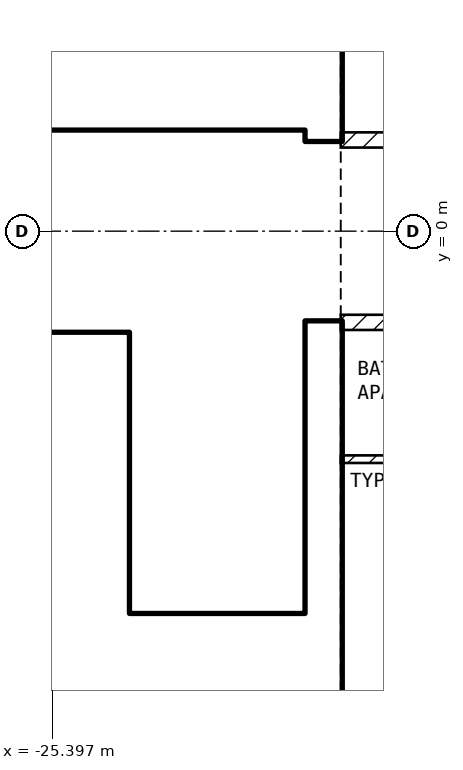
"""IFC4 building model, lengths in metres.
Left out: names, types, materials, properties, quantities, classifications, styles, units other than length and angle.
Written with IfcOpenShell. Run it as: python <this file> out.ifc"""

import sys

from ifc_helpers import new_model, si_unit, direction, frame, frame_2d, origin, place, context, subcontext, project, spatial, rectangle, extrude, element, fill, save


model = new_model("IFC4")
c1 = context("Model", 3, precision=1e-05, world=origin(), true_north=direction((0.0, 1.0)))
c2 = subcontext(c1, "Body", "Model", "MODEL_VIEW")
j1 = project(units=[si_unit("LENGTHUNIT", "METRE"), si_unit("PLANEANGLEUNIT", "RADIAN")], contexts=[c1])
p1 = place(None, origin())
s1 = spatial("IfcSite", under=j1, at=p1, CompositionType="ELEMENT")
p2 = place(p1, origin())
s2 = spatial("IfcBuilding", under=s1, at=p2, CompositionType="ELEMENT")
p3 = place(p2, frame((0.0, 0.0, 177.1)))
s3 = spatial("IfcBuildingStorey", under=s2, at=p3, CompositionType="ELEMENT", Elevation=177.1)
for number, where, z_axis, x_axis in (
    (1, (-21.825, -8.1, 0.0), (0.0, 0.0, 1.0), (0.0, 1.0, 0.0)),
    (2, (-21.825, 1.2, 0.0), (0.0, 0.0, 1.0), (0.0, 1.0, 0.0)),
):
    element("IfcWall", number, at=place(p3, frame(where, z_axis=z_axis, x_axis=x_axis)), inside=s3, PredefinedType="SHEAR", context=c2, shape_type="SweptSolid", body=[
        extrude(rectangle(XDim=6.9, YDim=0.45, at=frame_2d((3.45, 0.0))), origin(), (0.0, 0.0, 1.0), 3.25),
    ])
p4 = place(p3, frame((-33.2, 1.45, 0.0), z_axis=(0.0, 0.0, 1.0), x_axis=(1.0, 0.0, 0.0)))
e3 = element("IfcWall", 3, at=p4, inside=s3, PredefinedType="SOLIDWALL", context=c2, shape_type="SweptSolid", body=[
    extrude(rectangle(XDim=11.15, YDim=0.2, at=frame_2d((5.575, 0.0))), origin(), (0.0, 0.0, 1.0), 3.25),
])
p5 = place(p4, frame((9.4, 0.0, 0.0)))
e4 = element("IfcOpeningElement", 4, at=p5, cuts=e3, PredefinedType="OPENING", context=c2, shape_type="SweptSolid", body=[
    extrude(rectangle(XDim=1.0, YDim=2.1, at=frame_2d((0.5, 1.05))), frame((0.0, 0.11, 0.0), z_axis=(0.0, -1.0, 0.0), x_axis=(1.0, 0.0, 0.0)), (0.0, 0.0, 1.0), 0.22),
])
p6 = place(p4, frame((6.9, 0.0, 0.0)))
e5 = element("IfcOpeningElement", 5, at=p6, cuts=e3, PredefinedType="OPENING", context=c2, shape_type="SweptSolid", body=[
    extrude(rectangle(XDim=1.0, YDim=2.1, at=frame_2d((0.5, 1.05))), frame((0.0, 0.11, 0.0), z_axis=(0.0, -1.0, 0.0), x_axis=(1.0, 0.0, 0.0)), (0.0, 0.0, 1.0), 0.22),
])
p7 = place(p4, frame((1.1, 0.0, 0.0)))
e6 = element("IfcOpeningElement", 6, at=p7, cuts=e3, PredefinedType="OPENING", context=c2, shape_type="SweptSolid", body=[
    extrude(rectangle(XDim=0.9, YDim=2.1, at=frame_2d((0.45, 1.05))), frame((0.0, 0.11, 0.0), z_axis=(0.0, -1.0, 0.0), x_axis=(1.0, 0.0, 0.0)), (0.0, 0.0, 1.0), 0.22),
])
p8 = place(p3, frame((-24.5, -5.05, 0.0), z_axis=(0.0, 0.0, 1.0), x_axis=(0.0, 1.0, 0.0)))
e7 = element("IfcWall", 7, at=p8, inside=s3, PredefinedType="SOLIDWALL", context=c2, shape_type="SweptSolid", body=[
    extrude(rectangle(XDim=3.7, YDim=0.2, at=frame_2d((1.85, 0.0))), origin(), (0.0, 0.0, 1.0), 3.25),
])
p9 = place(p8, frame((0.1, 0.0, 0.0)))
e8 = element("IfcOpeningElement", 8, at=p9, cuts=e7, PredefinedType="OPENING", context=c2, shape_type="SweptSolid", body=[
    extrude(rectangle(XDim=0.8, YDim=2.1, at=frame_2d((0.4, 1.05))), frame((0.0, 0.11, 0.0), z_axis=(0.0, -1.0, 0.0), x_axis=(1.0, 0.0, 0.0)), (0.0, 0.0, 1.0), 0.22),
])
p10 = place(p3, frame((-28.35, -5.15, 0.0), z_axis=(0.0, 0.0, 1.0), x_axis=(1.0, 0.0, 0.0)))
e9 = element("IfcWall", 9, at=p10, inside=s3, PredefinedType="SOLIDWALL", context=c2, shape_type="SweptSolid", body=[
    extrude(rectangle(XDim=6.3, YDim=0.2, at=frame_2d((3.15, 0.0))), origin(), (0.0, 0.0, 1.0), 3.25),
])
p11 = place(p10, frame((5.1, 0.0, 0.0)))
e10 = element("IfcOpeningElement", 10, at=p11, cuts=e9, PredefinedType="OPENING", context=c2, shape_type="SweptSolid", body=[
    extrude(rectangle(XDim=1.0, YDim=2.1, at=frame_2d((0.5, 1.05))), frame((0.0, 0.11, 0.0), z_axis=(0.0, -1.0, 0.0), x_axis=(1.0, 0.0, 0.0)), (0.0, 0.0, 1.0), 0.22),
])
p12 = place(p3, frame((-33.2, -1.45, 0.0), z_axis=(0.0, 0.0, 1.0), x_axis=(1.0, 0.0, 0.0)))
e11 = element("IfcWall", 11, at=p12, inside=s3, PredefinedType="SOLIDWALL", context=c2, shape_type="SweptSolid", body=[
    extrude(rectangle(XDim=8.6, YDim=0.2, at=frame_2d((4.3, 0.0))), origin(), (0.0, 0.0, 1.0), 3.25),
])
p13 = place(p12, frame((7.2, 0.0, 0.0)))
e12 = element("IfcOpeningElement", 12, at=p13, cuts=e11, PredefinedType="OPENING", context=c2, shape_type="SweptSolid", body=[
    extrude(rectangle(XDim=1.0, YDim=2.1, at=frame_2d((0.5, 1.05))), frame((0.0, 0.11, 0.0), z_axis=(0.0, -1.0, 0.0), x_axis=(1.0, 0.0, 0.0)), (0.0, 0.0, 1.0), 0.22),
])
p14 = place(p12, frame((5.2, 0.0, 0.0)))
e13 = element("IfcOpeningElement", 13, at=p14, cuts=e11, PredefinedType="OPENING", context=c2, shape_type="SweptSolid", body=[
    extrude(rectangle(XDim=1.0, YDim=2.1, at=frame_2d((0.5, 1.05))), frame((0.0, 0.11, 0.0), z_axis=(0.0, -1.0, 0.0), x_axis=(1.0, 0.0, 0.0)), (0.0, 0.0, 1.0), 0.22),
])
p15 = place(p12, frame((3.2, 0.0, 0.0)))
e14 = element("IfcOpeningElement", 14, at=p15, cuts=e11, PredefinedType="OPENING", context=c2, shape_type="SweptSolid", body=[
    extrude(rectangle(XDim=1.0, YDim=2.1, at=frame_2d((0.5, 1.05))), frame((0.0, 0.11, 0.0), z_axis=(0.0, -1.0, 0.0), x_axis=(1.0, 0.0, 0.0)), (0.0, 0.0, 1.0), 0.22),
])
p16 = place(p12, frame((0.85, 0.0, 0.0)))
e15 = element("IfcOpeningElement", 15, at=p16, cuts=e11, PredefinedType="OPENING", context=c2, shape_type="SweptSolid", body=[
    extrude(rectangle(XDim=0.9, YDim=2.1, at=frame_2d((0.45, 1.05))), frame((0.0, 0.11, 0.0), z_axis=(0.0, -1.0, 0.0), x_axis=(1.0, 0.0, 0.0)), (0.0, 0.0, 1.0), 0.22),
])
p17 = place(p3, frame((-33.2, -3.95, 0.0), z_axis=(0.0, 0.0, 1.0), x_axis=(1.0, 0.0, 0.0)))
e16 = element("IfcWall", 16, at=p17, inside=s3, PredefinedType="SOLIDWALL", context=c2, shape_type="SweptSolid", body=[
    extrude(rectangle(XDim=8.6, YDim=0.2, at=frame_2d((4.3, 0.0))), origin(), (0.0, 0.0, 1.0), 3.25),
])
p18 = place(p3, frame((-21.6, 1.2, 0.0), z_axis=(0.0, 0.0, 1.0), x_axis=(1.0, 0.0, 0.0)))
e17 = element("IfcWall", 17, at=p18, inside=s3, PredefinedType="PARTITIONING", context=c2, shape_type="SweptSolid", body=[
    extrude(rectangle(XDim=17.2, YDim=0.2, at=frame_2d((8.6, 0.0))), origin(), (0.0, 0.0, 1.0), 3.25),
])
p19 = place(p18, frame((7.75, 0.0, 0.0)))
e18 = element("IfcOpeningElement", 18, at=p19, cuts=e17, PredefinedType="OPENING", context=c2, shape_type="SweptSolid", body=[
    extrude(rectangle(XDim=1.0, YDim=2.1, at=frame_2d((0.5, 1.05))), frame((0.0, 0.11, 0.0), z_axis=(0.0, -1.0, 0.0), x_axis=(1.0, 0.0, 0.0)), (0.0, 0.0, 1.0), 0.22),
])
p20 = place(p3, frame((-4.4, -1.2, 0.0), z_axis=(0.0, 0.0, 1.0), x_axis=(-1.0, 0.0, 0.0)))
e19 = element("IfcWall", 19, at=p20, inside=s3, PredefinedType="PARTITIONING", context=c2, shape_type="SweptSolid", body=[
    extrude(rectangle(XDim=17.2, YDim=0.2, at=frame_2d((8.6, 0.0))), origin(), (0.0, 0.0, 1.0), 3.25),
])
p21 = place(p20, frame((12.35, 0.0, 0.0)))
e20 = element("IfcOpeningElement", 20, at=p21, cuts=e19, PredefinedType="OPENING", context=c2, shape_type="SweptSolid", body=[
    extrude(rectangle(XDim=1.0, YDim=2.1, at=frame_2d((0.5, 1.05))), frame((0.0, 0.11, 0.0), z_axis=(0.0, -1.0, 0.0), x_axis=(1.0, 0.0, 0.0)), (0.0, 0.0, 1.0), 0.22),
])
p22 = place(p3, frame((-18.45, -3.0, 0.0), z_axis=(0.0, 0.0, 1.0), x_axis=(-1.0, 0.0, 0.0)))
e21 = element("IfcWall", 21, at=p22, inside=s3, PredefinedType="PARTITIONING", context=c2, shape_type="SweptSolid", body=[
    extrude(rectangle(XDim=3.15, YDim=0.1, at=frame_2d((1.575, 0.0))), origin(), (0.0, 0.0, 1.0), 3.25),
])
p23 = place(p13, origin())
e22 = element("IfcDoor", 22, at=p23, inside=s3, OperationType="DOUBLE_DOOR_SLIDING", PredefinedType="DOOR", context=c2, shape_type="SweptSolid", body=[
    extrude(rectangle(XDim=1.0, YDim=2.1, at=frame_2d((0.5, 1.05))), frame((0.0, 0.025, 0.0), z_axis=(0.0, -1.0, 0.0), x_axis=(1.0, 0.0, 0.0)), (0.0, 0.0, 1.0), 0.05),
])
fill(e12, e22)
p24 = place(p11, origin())
e23 = element("IfcDoor", 23, at=p24, inside=s3, OperationType="SINGLE_SWING_LEFT", PredefinedType="DOOR", context=c2, shape_type="SweptSolid", body=[
    extrude(rectangle(XDim=1.0, YDim=2.1, at=frame_2d((0.5, 1.05))), frame((0.0, 0.025, 0.0), z_axis=(0.0, -1.0, 0.0), x_axis=(1.0, 0.0, 0.0)), (0.0, 0.0, 1.0), 0.05),
])
fill(e10, e23)
p25 = place(p5, origin())
e24 = element("IfcDoor", 24, at=p25, inside=s3, OperationType="SINGLE_SWING_LEFT", PredefinedType="DOOR", context=c2, shape_type="SweptSolid", body=[
    extrude(rectangle(XDim=1.0, YDim=2.1, at=frame_2d((0.5, 1.05))), frame((0.0, 0.025, 0.0), z_axis=(0.0, -1.0, 0.0), x_axis=(1.0, 0.0, 0.0)), (0.0, 0.0, 1.0), 0.05),
])
fill(e4, e24)
p26 = place(p9, origin())
e25 = element("IfcDoor", 25, at=p26, inside=s3, OperationType="SINGLE_SWING_LEFT", PredefinedType="DOOR", context=c2, shape_type="SweptSolid", body=[
    extrude(rectangle(XDim=0.8, YDim=2.1, at=frame_2d((0.4, 1.05))), frame((0.0, 0.025, 0.0), z_axis=(0.0, -1.0, 0.0), x_axis=(1.0, 0.0, 0.0)), (0.0, 0.0, 1.0), 0.05),
])
fill(e8, e25)
p27 = place(p6, origin())
e26 = element("IfcDoor", 26, at=p27, inside=s3, OperationType="SINGLE_SWING_LEFT", PredefinedType="DOOR", context=c2, shape_type="SweptSolid", body=[
    extrude(rectangle(XDim=1.0, YDim=2.1, at=frame_2d((0.5, 1.05))), frame((0.0, 0.025, 0.0), z_axis=(0.0, -1.0, 0.0), x_axis=(1.0, 0.0, 0.0)), (0.0, 0.0, 1.0), 0.05),
])
fill(e5, e26)
save(model, sys.argv[1])
